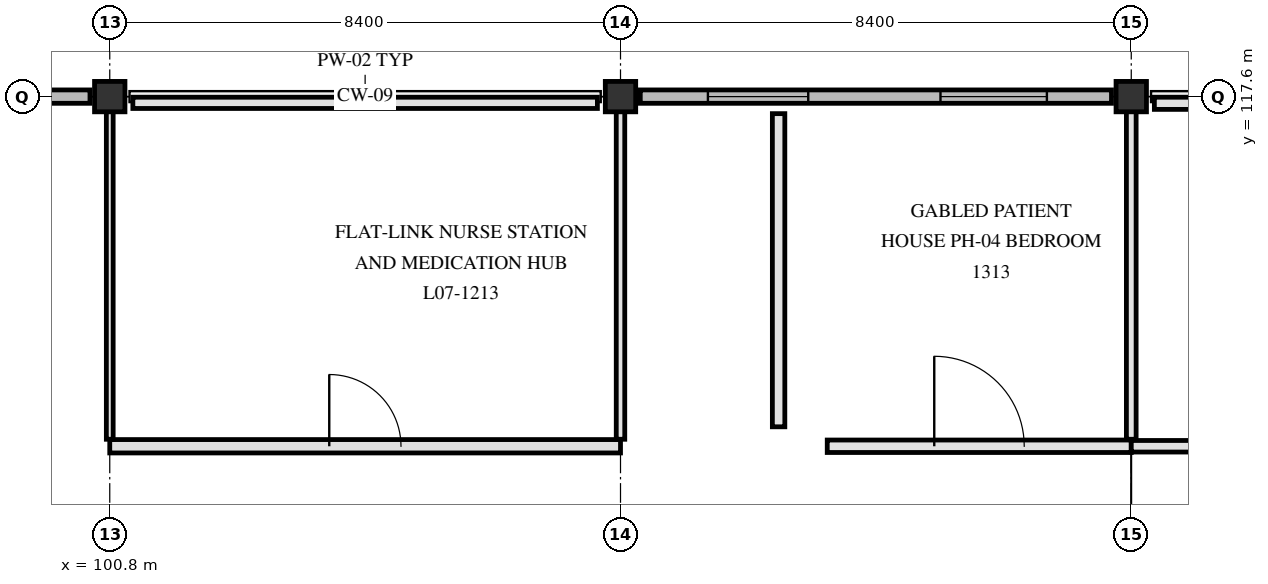
"""IFC4 building model, lengths in metres.
Left out: names, types, materials, properties, quantities, classifications, styles, units other than length and angle.
Written with IfcOpenShell. Run it as: python <this file> out.ifc"""

import sys

from ifc_helpers import new_model, si_unit, direction, frame, frame_2d, origin, origin_2d, place, context, subcontext, project, spatial, polyline, rectangle, outline, extrude, element, fill, save


model = new_model("IFC4")
c1 = context("Model", 3, precision=1e-05, world=origin(), true_north=direction((0.0, 1.0)))
c2 = subcontext(c1, "Body", "Model", "MODEL_VIEW")
j1 = project(units=[si_unit("LENGTHUNIT", "METRE"), si_unit("PLANEANGLEUNIT", "RADIAN")], contexts=[c1])
p1 = place(None, origin())
s1 = spatial("IfcSite", under=j1, at=p1, CompositionType="ELEMENT")
p2 = place(p1, origin())
s2 = spatial("IfcBuilding", under=s1, at=p2, CompositionType="ELEMENT")
p3 = place(p2, frame((0.0, 0.0, 30.3)))
s3 = spatial("IfcBuildingStorey", under=s2, at=p3, CompositionType="ELEMENT", Elevation=30.3)
for number, where, z_axis, x_axis in (
    (1, (100.8, 117.6, 0.0), (0.0, 0.0, 1.0), (1.0, 0.0, 0.0)),
    (2, (109.2, 117.6, 0.0), (0.0, 0.0, 1.0), (1.0, 0.0, 0.0)),
    (3, (117.6, 117.6, 0.0), (0.0, 0.0, 1.0), (1.0, 0.0, 0.0)),
):
    element("IfcColumn", number, at=place(p3, frame(where, z_axis=z_axis, x_axis=x_axis)), inside=s3, PredefinedType="COLUMN", context=c2, shape_type="SweptSolid", body=[
        extrude(rectangle(XDim=0.5, YDim=0.5, at=origin_2d()), origin(), (0.0, 0.0, 1.0), 3.9),
    ])
p4 = place(p3, frame((92.725, 117.6, 0.0), z_axis=(0.0, 0.0, 1.0), x_axis=(1.0, 0.0, 0.0)))
e4 = element("IfcWall", 4, at=p4, inside=s3, PredefinedType="SOLIDWALL", context=c2, shape_type="SweptSolid", body=[
    extrude(outline(polyline([(0.0, 0.0), (7.75, 0.0), (7.75, 3.4), (3.875, 5.76), (0.0, 3.4), (0.0, 0.0)])), frame((0.0, 0.11, 0.0), z_axis=(0.0, -1.0, 0.0), x_axis=(1.0, 0.0, 0.0)), (0.0, 0.0, 1.0), 0.22),
])
p5 = place(p4, frame((1.212, 0.0, 0.85)))
e5 = element("IfcOpeningElement", 5, at=p5, cuts=e4, PredefinedType="OPENING", context=c2, shape_type="SweptSolid", body=[
    extrude(rectangle(XDim=1.45, YDim=1.54, at=frame_2d((0.725, 0.77))), frame((0.0, 0.12, 0.0), z_axis=(0.0, -1.0, 0.0), x_axis=(1.0, 0.0, 0.0)), (0.0, 0.0, 1.0), 0.24),
])
p6 = place(p4, frame((5.038, 0.0, 0.85)))
e6 = element("IfcOpeningElement", 6, at=p6, cuts=e4, PredefinedType="OPENING", context=c2, shape_type="SweptSolid", body=[
    extrude(rectangle(XDim=1.55, YDim=1.54, at=frame_2d((0.775, 0.77))), frame((0.0, 0.12, 0.0), z_axis=(0.0, -1.0, 0.0), x_axis=(1.0, 0.0, 0.0)), (0.0, 0.0, 1.0), 0.24),
])
p7 = place(p3, frame((109.525, 117.6, 0.0), z_axis=(0.0, 0.0, 1.0), x_axis=(1.0, 0.0, 0.0)))
e7 = element("IfcWall", 7, at=p7, inside=s3, PredefinedType="SOLIDWALL", context=c2, shape_type="SweptSolid", body=[
    extrude(outline(polyline([(0.0, 0.0), (7.75, 0.0), (7.75, 3.4), (3.875, 5.76), (0.0, 3.4), (0.0, 0.0)])), frame((0.0, 0.11, 0.0), z_axis=(0.0, -1.0, 0.0), x_axis=(1.0, 0.0, 0.0)), (0.0, 0.0, 1.0), 0.22),
])
p8 = place(p7, frame((1.113, 0.0, 0.85)))
e8 = element("IfcOpeningElement", 8, at=p8, cuts=e7, PredefinedType="OPENING", context=c2, shape_type="SweptSolid", body=[
    extrude(rectangle(XDim=1.65, YDim=1.54, at=frame_2d((0.825, 0.77))), frame((0.0, 0.12, 0.0), z_axis=(0.0, -1.0, 0.0), x_axis=(1.0, 0.0, 0.0)), (0.0, 0.0, 1.0), 0.24),
])
p9 = place(p7, frame((4.938, 0.0, 0.85)))
e9 = element("IfcOpeningElement", 9, at=p9, cuts=e7, PredefinedType="OPENING", context=c2, shape_type="SweptSolid", body=[
    extrude(rectangle(XDim=1.75, YDim=1.54, at=frame_2d((0.875, 0.77))), frame((0.0, 0.12, 0.0), z_axis=(0.0, -1.0, 0.0), x_axis=(1.0, 0.0, 0.0)), (0.0, 0.0, 1.0), 0.24),
])
p10 = place(p3, frame((117.98, 117.49, 3.88), z_axis=(0.0, 0.0, 1.0), x_axis=(1.0, 0.0, 0.0)))
e10 = element("IfcWall", 10, at=p10, inside=s3, PredefinedType="PARAPET", context=c2, shape_type="SweptSolid", body=[
    extrude(rectangle(XDim=8.02, YDim=0.2, at=frame_2d((4.01, 0.0))), origin(), (0.0, 0.0, 1.0), 0.47),
])
p11 = place(p3, frame((101.18, 117.498, 3.88), z_axis=(0.0, 0.0, 1.0), x_axis=(1.0, 0.0, 0.0)))
e11 = element("IfcWall", 11, at=p11, inside=s3, PredefinedType="PARAPET", context=c2, shape_type="SweptSolid", body=[
    extrude(rectangle(XDim=7.64, YDim=0.185, at=frame_2d((3.82, 0.0))), origin(), (0.0, 0.0, 1.0), 0.47),
])
p12 = place(p3, frame((100.8, 111.85, 0.0), z_axis=(0.0, 0.0, 1.0), x_axis=(1.0, 0.0, 0.0)))
e12 = element("IfcWall", 12, at=p12, inside=s3, PredefinedType="PARTITIONING", context=c2, shape_type="SweptSolid", body=[
    extrude(rectangle(XDim=8.4, YDim=0.22, at=frame_2d((4.2, 0.0))), origin(), (0.0, 0.0, 1.0), 3.25),
])
p13 = place(p12, frame((3.61, 0.0, 0.0)))
e13 = element("IfcOpeningElement", 13, at=p13, cuts=e12, PredefinedType="OPENING", context=c2, shape_type="SweptSolid", body=[
    extrude(rectangle(XDim=1.18, YDim=2.18, at=frame_2d((0.59, 1.09))), frame((0.0, 0.12, 0.0), z_axis=(0.0, -1.0, 0.0), x_axis=(1.0, 0.0, 0.0)), (0.0, 0.0, 1.0), 0.24),
])
p14 = place(p3, frame((112.6, 111.85, 0.0), z_axis=(0.0, 0.0, 1.0), x_axis=(1.0, 0.0, 0.0)))
e14 = element("IfcWall", 14, at=p14, inside=s3, PredefinedType="PARTITIONING", context=c2, shape_type="SweptSolid", body=[
    extrude(rectangle(XDim=5.0, YDim=0.205, at=frame_2d((2.5, 0.0))), origin(), (0.0, 0.0, 1.0), 3.25),
])
p15 = place(p14, frame((1.76, 0.0, 0.0)))
e15 = element("IfcOpeningElement", 15, at=p15, cuts=e14, PredefinedType="OPENING", context=c2, shape_type="SweptSolid", body=[
    extrude(rectangle(XDim=1.48, YDim=2.22, at=frame_2d((0.74, 1.11))), frame((0.0, 0.113, 0.0), z_axis=(0.0, -1.0, 0.0), x_axis=(1.0, 0.0, 0.0)), (0.0, 0.0, 1.0), 0.225),
])
p16 = place(p3, frame((117.6, 111.85, 0.0), z_axis=(0.0, 0.0, 1.0), x_axis=(1.0, 0.0, 0.0)))
e16 = element("IfcWall", 16, at=p16, inside=s3, PredefinedType="PARTITIONING", context=c2, shape_type="SweptSolid", body=[
    extrude(rectangle(XDim=8.025, YDim=0.19, at=frame_2d((4.012, 0.0))), origin(), (0.0, 0.0, 1.0), 3.25),
])
p17 = place(p16, frame((3.353, 0.0, 0.0)))
e17 = element("IfcOpeningElement", 17, at=p17, cuts=e16, PredefinedType="OPENING", context=c2, shape_type="SweptSolid", body=[
    extrude(rectangle(XDim=1.32, YDim=2.18, at=frame_2d((0.66, 1.09))), frame((0.0, 0.105, 0.0), z_axis=(0.0, -1.0, 0.0), x_axis=(1.0, 0.0, 0.0)), (0.0, 0.0, 1.0), 0.21),
])
p18 = place(p3, frame((100.8, 111.965, 0.0), z_axis=(0.0, 0.0, 1.0), x_axis=(0.0, 1.0, 0.0)))
e18 = element("IfcWall", 18, at=p18, inside=s3, PredefinedType="PARTITIONING", context=c2, shape_type="SweptSolid", body=[
    extrude(rectangle(XDim=5.39, YDim=0.112, at=frame_2d((2.695, 0.0))), origin(), (0.0, 0.0, 1.0), 3.25),
])
p19 = place(p3, frame((109.2, 111.965, 0.0), z_axis=(0.0, 0.0, 1.0), x_axis=(0.0, 1.0, 0.0)))
e19 = element("IfcWall", 19, at=p19, inside=s3, PredefinedType="PARTITIONING", context=c2, shape_type="SweptSolid", body=[
    extrude(rectangle(XDim=5.39, YDim=0.14, at=frame_2d((2.695, 0.0))), origin(), (0.0, 0.0, 1.0), 3.25),
])
p20 = place(p3, frame((111.8, 112.17, 0.0), z_axis=(0.0, 0.0, 1.0), x_axis=(0.0, 1.0, 0.0)))
e20 = element("IfcWall", 20, at=p20, inside=s3, PredefinedType="PARTITIONING", context=c2, shape_type="SweptSolid", body=[
    extrude(rectangle(XDim=5.15, YDim=0.205, at=frame_2d((2.575, 0.0))), origin(), (0.0, 0.0, 1.0), 3.41),
])
p21 = place(p3, frame((117.6, 111.965, 0.0), z_axis=(0.0, 0.0, 1.0), x_axis=(0.0, 1.0, 0.0)))
e21 = element("IfcWall", 21, at=p21, inside=s3, PredefinedType="PARTITIONING", context=c2, shape_type="SweptSolid", body=[
    extrude(rectangle(XDim=5.39, YDim=0.16, at=frame_2d((2.695, 0.0))), origin(), (0.0, 0.0, 1.0), 3.25),
])
p22 = place(p8, origin())
e22 = element("IfcWindow", 22, at=p22, inside=s3, PartitioningType="SINGLE_PANEL", PredefinedType="WINDOW", context=c2, shape_type="SweptSolid", body=[
    extrude(rectangle(XDim=1.65, YDim=1.54, at=frame_2d((0.825, 0.77))), frame((0.0, 0.03, 0.0), z_axis=(0.0, -1.0, 0.0), x_axis=(1.0, 0.0, 0.0)), (0.0, 0.0, 1.0), 0.06),
])
fill(e8, e22)
p23 = place(p9, origin())
e23 = element("IfcWindow", 23, at=p23, inside=s3, PartitioningType="SINGLE_PANEL", PredefinedType="WINDOW", context=c2, shape_type="SweptSolid", body=[
    extrude(rectangle(XDim=1.75, YDim=1.54, at=frame_2d((0.875, 0.77))), frame((0.0, 0.03, 0.0), z_axis=(0.0, -1.0, 0.0), x_axis=(1.0, 0.0, 0.0)), (0.0, 0.0, 1.0), 0.06),
])
fill(e9, e23)
p24 = place(p13, origin())
e24 = element("IfcDoor", 24, at=p24, inside=s3, OperationType="SINGLE_SWING_LEFT", PredefinedType="DOOR", context=c2, shape_type="SweptSolid", body=[
    extrude(rectangle(XDim=1.18, YDim=2.18, at=frame_2d((0.59, 1.09))), frame((0.0, 0.025, 0.0), z_axis=(0.0, -1.0, 0.0), x_axis=(1.0, 0.0, 0.0)), (0.0, 0.0, 1.0), 0.05),
])
fill(e13, e24)
p25 = place(p15, origin())
e25 = element("IfcDoor", 25, at=p25, inside=s3, OperationType="SINGLE_SWING_LEFT", PredefinedType="DOOR", context=c2, shape_type="SweptSolid", body=[
    extrude(rectangle(XDim=1.48, YDim=2.22, at=frame_2d((0.74, 1.11))), frame((0.0, 0.025, 0.0), z_axis=(0.0, -1.0, 0.0), x_axis=(1.0, 0.0, 0.0)), (0.0, 0.0, 1.0), 0.05),
])
fill(e15, e25)
save(model, sys.argv[1])
